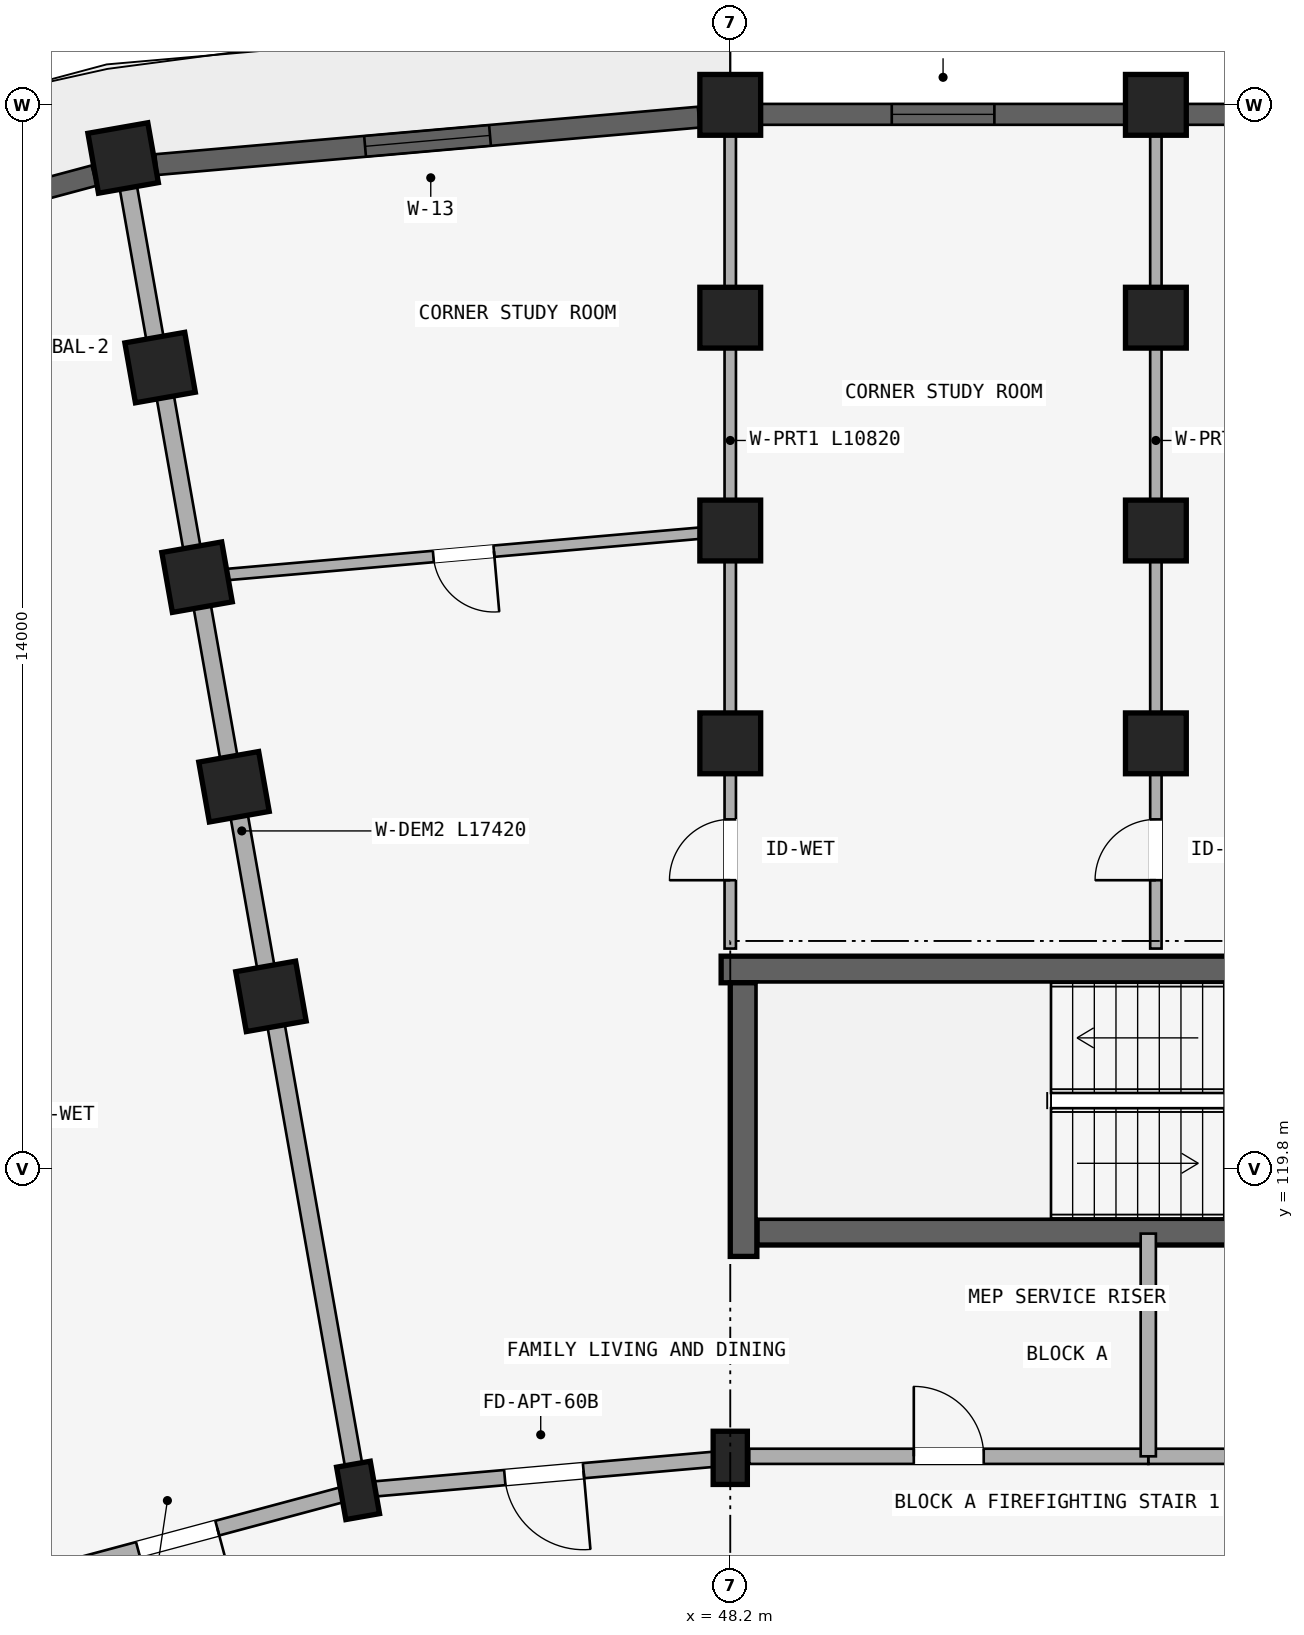
"""IFC4 building model, lengths in metres.
Left out: names, types, materials, properties, quantities, classifications, styles, units other than length and angle.
Written with IfcOpenShell. Run it as: python <this file> out.ifc"""

import sys

from ifc_helpers import new_model, si_unit, direction, frame, frame_2d, origin, origin_2d, place, context, subcontext, project, spatial, rectangle, extrude, element, fill, save


model = new_model("IFC4")
c1 = context("Model", 3, precision=1e-05, world=origin(), true_north=direction((0.0, 1.0)))
c2 = subcontext(c1, "Body", "Model", "MODEL_VIEW")
j1 = project(units=[si_unit("LENGTHUNIT", "METRE"), si_unit("PLANEANGLEUNIT", "RADIAN")], contexts=[c1])
p1 = place(None, origin())
s1 = spatial("IfcSite", under=j1, at=p1, CompositionType="ELEMENT")
p2 = place(p1, origin())
s2 = spatial("IfcBuilding", under=s1, at=p2, CompositionType="ELEMENT")
p3 = place(p2, frame((0.0, 0.0, 11.85)))
s3 = spatial("IfcBuildingStorey", under=s2, at=p3, CompositionType="ELEMENT", Elevation=11.85)
p4 = place(p3, frame((48.08, 122.425, 0.0), z_axis=(0.0, 0.0, 1.0), x_axis=(1.0, 0.0, 0.0)))
e1 = element("IfcWall", 1, at=p4, inside=s3, PredefinedType="SHEAR", context=c2, shape_type="SweptSolid", body=[
    extrude(rectangle(XDim=8.545, YDim=0.35, at=frame_2d((4.272, 0.0))), origin(), (0.0, 0.0, 1.0), 2.93),
])
p5 = place(p3, frame((48.55, 118.975, 0.0), z_axis=(0.0, 0.0, 1.0), x_axis=(1.0, 0.0, 0.0)))
e2 = element("IfcWall", 2, at=p5, inside=s3, PredefinedType="SHEAR", context=c2, shape_type="SweptSolid", body=[
    extrude(rectangle(XDim=8.075, YDim=0.35, at=frame_2d((4.038, 0.0))), origin(), (0.0, 0.0, 1.0), 2.93),
])
p6 = place(p5, frame((6.38, 0.0, 0.0)))
e3 = element("IfcOpeningElement", 3, at=p6, cuts=e2, PredefinedType="OPENING", context=c2, shape_type="SweptSolid", body=[
    extrude(rectangle(XDim=1.24, YDim=2.15, at=frame_2d((0.62, 1.075))), frame((0.0, 0.185, 0.0), z_axis=(0.0, -1.0, 0.0), x_axis=(1.0, 0.0, 0.0)), (0.0, 0.0, 1.0), 0.37),
])
p7 = place(p3, frame((48.375, 118.65, 0.0), z_axis=(0.0, 0.0, 1.0), x_axis=(0.0, 1.0, 0.0)))
e4 = element("IfcWall", 4, at=p7, inside=s3, PredefinedType="SHEAR", context=c2, shape_type="SweptSolid", body=[
    extrude(rectangle(XDim=3.6, YDim=0.35, at=frame_2d((1.8, 0.0))), origin(), (0.0, 0.0, 1.0), 2.93),
])
p8 = place(p3, frame((48.2, 116.0, 0.0), z_axis=(0.0, 0.0, 1.0), x_axis=(1.0, 0.0, 0.0)))
e5 = element("IfcColumn", 5, at=p8, inside=s3, PredefinedType="COLUMN", context=c2, shape_type="SweptSolid", body=[
    extrude(rectangle(XDim=0.45, YDim=0.7, at=origin_2d()), origin(), (0.0, 0.0, 1.0), 2.93),
])
for number, where, z_axis, x_axis in (
    (6, (48.2, 125.4, 0.0), (0.0, 0.0, 1.0), (1.0, 0.0, 0.0)),
    (7, (48.2, 128.2, 0.0), (0.0, 0.0, 1.0), (1.0, 0.0, 0.0)),
    (8, (48.2, 131.0, 0.0), (0.0, 0.0, 1.0), (1.0, 0.0, 0.0)),
    (9, (48.2, 133.8, 0.0), (0.0, 0.0, 1.0), (1.0, 0.0, 0.0)),
):
    element("IfcColumn", number, at=place(p3, frame(where, z_axis=z_axis, x_axis=x_axis)), inside=s3, PredefinedType="COLUMN", context=c2, shape_type="SweptSolid", body=[
        extrude(rectangle(XDim=0.8, YDim=0.8, at=origin_2d()), origin(), (0.0, 0.0, 1.0), 2.93),
    ])
p9 = place(p3, frame((43.303, 115.572, 0.0), z_axis=(0.0, 0.0, 1.0), x_axis=(0.984807753012, 0.173648177667, 0.0)))
e10 = element("IfcColumn", 10, at=p9, inside=s3, PredefinedType="COLUMN", context=c2, shape_type="SweptSolid", body=[
    extrude(rectangle(XDim=0.45, YDim=0.7, at=origin_2d()), origin(), (0.0, 0.0, 1.0), 2.93),
])
for number, where, z_axis, x_axis in (
    (11, (42.157, 122.071, 0.0), (0.0, 0.0, 1.0), (0.985, 0.174, 0.0)),
    (12, (41.671, 124.829, 0.0), (0.0, 0.0, 1.0), (0.985, 0.174, 0.0)),
    (13, (41.185, 127.586, 0.0), (0.0, 0.0, 1.0), (0.985, 0.174, 0.0)),
    (14, (40.698, 130.344, 0.0), (0.0, 0.0, 1.0), (0.985, 0.174, 0.0)),
    (15, (40.212, 133.101, 0.0), (0.0, 0.0, 1.0), (0.985, 0.174, 0.0)),
    (16, (53.8, 125.4, 0.0), (0.0, 0.0, 1.0), (1.0, 0.0, 0.0)),
    (17, (53.8, 128.2, 0.0), (0.0, 0.0, 1.0), (1.0, 0.0, 0.0)),
    (18, (53.8, 131.0, 0.0), (0.0, 0.0, 1.0), (1.0, 0.0, 0.0)),
    (19, (53.8, 133.8, 0.0), (0.0, 0.0, 1.0), (1.0, 0.0, 0.0)),
):
    element("IfcColumn", number, at=place(p3, frame(where, z_axis=z_axis, x_axis=x_axis)), inside=s3, PredefinedType="COLUMN", context=c2, shape_type="SweptSolid", body=[
        extrude(rectangle(XDim=0.8, YDim=0.8, at=origin_2d()), origin(), (0.0, 0.0, 1.0), 2.93),
    ])
p10 = place(p3, frame((53.7, 116.02, 0.0), z_axis=(0.0, 0.0, 1.0), x_axis=(1.0, 0.0, 0.0)))
e20 = element("IfcWall", 20, at=p10, inside=s3, PredefinedType="STANDARD", context=c2, shape_type="SweptSolid", body=[
    extrude(rectangle(XDim=5.65, YDim=0.2, at=frame_2d((2.825, 0.0))), origin(), (0.0, 0.0, 1.0), 2.372),
])
p11 = place(p10, frame((1.923, 0.0, 0.0)))
e21 = element("IfcOpeningElement", 21, at=p11, cuts=e20, PredefinedType="OPENING", context=c2, shape_type="SweptSolid", body=[
    extrude(rectangle(XDim=1.24, YDim=2.15, at=frame_2d((0.62, 1.075))), frame((0.0, 0.11, 0.0), z_axis=(0.0, -1.0, 0.0), x_axis=(1.0, 0.0, 0.0)), (0.0, 0.0, 1.0), 0.22),
])
p12 = place(p3, frame((48.45, 116.02, 0.0), z_axis=(0.0, 0.0, 1.0), x_axis=(1.0, 0.0, 0.0)))
e22 = element("IfcWall", 22, at=p12, inside=s3, PredefinedType="STANDARD", context=c2, shape_type="SweptSolid", body=[
    extrude(rectangle(XDim=5.25, YDim=0.2, at=frame_2d((2.625, 0.0))), origin(), (0.0, 0.0, 1.0), 2.372),
])
p13 = place(p12, frame((2.165, 0.0, 0.0)))
e23 = element("IfcOpeningElement", 23, at=p13, cuts=e22, PredefinedType="OPENING", context=c2, shape_type="SweptSolid", body=[
    extrude(rectangle(XDim=0.92, YDim=2.1, at=frame_2d((0.46, 1.05))), frame((0.0, 0.11, 0.0), z_axis=(0.0, -1.0, 0.0), x_axis=(1.0, 0.0, 0.0)), (0.0, 0.0, 1.0), 0.22),
])
p14 = place(p3, frame((53.7, 116.02, 0.0), z_axis=(0.0, 0.0, 1.0), x_axis=(0.0, 1.0, 0.0)))
e24 = element("IfcWall", 24, at=p14, inside=s3, PredefinedType="STANDARD", context=c2, shape_type="SweptSolid", body=[
    extrude(rectangle(XDim=2.93, YDim=0.2, at=frame_2d((1.465, 0.0))), origin(), (0.0, 0.0, 1.0), 2.372),
])
p15 = place(p3, frame((53.8, 122.7, 0.0), z_axis=(0.0, 0.0, 1.0), x_axis=(0.0, 1.0, 0.0)))
e25 = element("IfcWall", 25, at=p15, inside=s3, PredefinedType="PARTITIONING", context=c2, shape_type="SweptSolid", body=[
    extrude(rectangle(XDim=10.82, YDim=0.15, at=frame_2d((5.41, 0.0))), origin(), (0.0, 0.0, 1.0), 2.372),
])
p16 = place(p15, frame((0.899, 0.0, 0.0)))
e26 = element("IfcOpeningElement", 26, at=p16, cuts=e25, PredefinedType="OPENING", context=c2, shape_type="SweptSolid", body=[
    extrude(rectangle(XDim=0.8, YDim=2.1, at=frame_2d((0.4, 1.05))), frame((0.0, 0.085, 0.0), z_axis=(0.0, -1.0, 0.0), x_axis=(1.0, 0.0, 0.0)), (0.0, 0.0, 1.0), 0.17),
])
p17 = place(p3, frame((48.2, 116.0, 0.0), z_axis=(0.0, 0.0, 1.0), x_axis=(-0.996193663584, -0.087167566415, 0.0)))
e27 = element("IfcWall", 27, at=p17, inside=s3, PredefinedType="STANDARD", context=c2, shape_type="SweptSolid", body=[
    extrude(rectangle(XDim=4.916, YDim=0.2, at=frame_2d((2.458, 0.0))), origin(), (0.0, 0.0, 1.0), 2.372),
])
p18 = place(p17, frame((1.938, 0.0, 0.0)))
e28 = element("IfcOpeningElement", 28, at=p18, cuts=e27, PredefinedType="OPENING", context=c2, shape_type="SweptSolid", body=[
    extrude(rectangle(XDim=1.04, YDim=2.15, at=frame_2d((0.52, 1.075))), frame((0.0, 0.11, 0.0), z_axis=(0.0, -1.0, 0.0), x_axis=(1.0, 0.0, 0.0)), (0.0, 0.0, 1.0), 0.22),
])
p19 = place(p3, frame((43.303, 115.572, 0.0), z_axis=(0.0, 0.0, 1.0), x_axis=(-0.965930095386, -0.258803112091, 0.0)))
e29 = element("IfcWall", 29, at=p19, inside=s3, PredefinedType="STANDARD", context=c2, shape_type="SweptSolid", body=[
    extrude(rectangle(XDim=4.916, YDim=0.2, at=frame_2d((2.458, 0.0))), origin(), (0.0, 0.0, 1.0), 2.372),
])
p20 = place(p19, frame((1.918, 0.0, 0.0)))
e30 = element("IfcOpeningElement", 30, at=p20, cuts=e29, PredefinedType="OPENING", context=c2, shape_type="SweptSolid", body=[
    extrude(rectangle(XDim=1.08, YDim=2.15, at=frame_2d((0.54, 1.075))), frame((0.0, 0.11, 0.0), z_axis=(0.0, -1.0, 0.0), x_axis=(1.0, 0.0, 0.0)), (0.0, 0.0, 1.0), 0.22),
])
p21 = place(p3, frame((48.2, 122.7, 0.0), z_axis=(0.0, 0.0, 1.0), x_axis=(0.0, 1.0, 0.0)))
e31 = element("IfcWall", 31, at=p21, inside=s3, PredefinedType="PARTITIONING", context=c2, shape_type="SweptSolid", body=[
    extrude(rectangle(XDim=10.82, YDim=0.15, at=frame_2d((5.41, 0.0))), origin(), (0.0, 0.0, 1.0), 2.372),
])
p22 = place(p21, frame((0.899, 0.0, 0.0)))
e32 = element("IfcOpeningElement", 32, at=p22, cuts=e31, PredefinedType="OPENING", context=c2, shape_type="SweptSolid", body=[
    extrude(rectangle(XDim=0.8, YDim=2.1, at=frame_2d((0.4, 1.05))), frame((0.0, 0.085, 0.0), z_axis=(0.0, -1.0, 0.0), x_axis=(1.0, 0.0, 0.0)), (0.0, 0.0, 1.0), 0.17),
])
p23 = place(p3, frame((43.286, 115.67, 0.0), z_axis=(0.0, 0.0, 1.0), x_axis=(-0.173646216546, 0.984808098809, 0.0)))
e33 = element("IfcWall", 33, at=p23, inside=s3, PredefinedType="STANDARD", context=c2, shape_type="SweptSolid", body=[
    extrude(rectangle(XDim=17.42, YDim=0.23, at=frame_2d((8.71, 0.0))), origin(), (0.0, 0.0, 1.0), 2.372),
])
p24 = place(p3, frame((48.2, 128.2, 0.0), z_axis=(0.0, 0.0, 1.0), x_axis=(-0.996194658198, -0.087156198737, 0.0)))
e34 = element("IfcWall", 34, at=p24, inside=s3, PredefinedType="PLUMBINGWALL", context=c2, shape_type="SweptSolid", body=[
    extrude(rectangle(XDim=7.042, YDim=0.15, at=frame_2d((3.521, 0.0))), origin(), (0.0, 0.0, 1.0), 2.372),
])
p25 = place(p24, frame((3.121, 0.0, 0.0)))
e35 = element("IfcOpeningElement", 35, at=p25, cuts=e34, PredefinedType="OPENING", context=c2, shape_type="SweptSolid", body=[
    extrude(rectangle(XDim=0.8, YDim=2.1, at=frame_2d((0.4, 1.05))), frame((0.0, 0.085, 0.0), z_axis=(0.0, -1.0, 0.0), x_axis=(1.0, 0.0, 0.0)), (0.0, 0.0, 1.0), 0.17),
])
p26 = place(p3, frame((47.785, 133.638, 0.0), z_axis=(0.0, 0.0, 1.0), x_axis=(-0.99619608453, -0.08713989423, 0.0)))
e36 = element("IfcWall", 36, at=p26, inside=s3, PredefinedType="STANDARD", context=c2, shape_type="SweptSolid", body=[
    extrude(rectangle(XDim=7.164, YDim=0.275, at=frame_2d((3.582, 0.0))), origin(), (0.0, 0.0, 1.0), 2.372),
])
p27 = place(p26, frame((2.757, 0.0, 0.422)))
e37 = element("IfcOpeningElement", 37, at=p27, cuts=e36, PredefinedType="OPENING", context=c2, shape_type="SweptSolid", body=[
    extrude(rectangle(XDim=1.65, YDim=1.75, at=frame_2d((0.825, 0.875))), frame((0.0, 0.147, 0.0), z_axis=(0.0, -1.0, 0.0), x_axis=(1.0, 0.0, 0.0)), (0.0, 0.0, 1.0), 0.295),
])
p28 = place(p3, frame((39.832, 132.87, 0.0), z_axis=(0.0, 0.0, 1.0), x_axis=(-0.965923712619, -0.258826933296, 0.0)))
e38 = element("IfcWall", 38, at=p28, inside=s3, PredefinedType="STANDARD", context=c2, shape_type="SweptSolid", body=[
    extrude(rectangle(XDim=7.164, YDim=0.275, at=frame_2d((3.582, 0.0))), origin(), (0.0, 0.0, 1.0), 2.372),
])
p29 = place(p28, frame((4.69, 0.0, 0.522)))
e39 = element("IfcOpeningElement", 39, at=p29, cuts=e38, PredefinedType="OPENING", context=c2, shape_type="SweptSolid", body=[
    extrude(rectangle(XDim=1.2, YDim=1.5, at=frame_2d((0.6, 0.75))), frame((0.0, 0.147, 0.0), z_axis=(0.0, -1.0, 0.0), x_axis=(1.0, 0.0, 0.0)), (0.0, 0.0, 1.0), 0.295),
])
p30 = place(p28, frame((1.877, 0.0, 0.0)))
e40 = element("IfcOpeningElement", 40, at=p30, cuts=e38, PredefinedType="OPENING", context=c2, shape_type="SweptSolid", body=[
    extrude(rectangle(XDim=1.26, YDim=2.15, at=frame_2d((0.63, 1.075))), frame((0.0, 0.147, 0.0), z_axis=(0.0, -1.0, 0.0), x_axis=(1.0, 0.0, 0.0)), (0.0, 0.0, 1.0), 0.295),
])
p31 = place(p3, frame((48.604, 133.675, 0.0), z_axis=(0.0, 0.0, 1.0), x_axis=(1.0, 0.0, 0.0)))
e41 = element("IfcWall", 41, at=p31, inside=s3, PredefinedType="STANDARD", context=c2, shape_type="SweptSolid", body=[
    extrude(rectangle(XDim=4.793, YDim=0.275, at=frame_2d((2.396, 0.0))), origin(), (0.0, 0.0, 1.0), 2.472),
])
p32 = place(p31, frame((1.721, 0.0, 0.672)))
e42 = element("IfcOpeningElement", 42, at=p32, cuts=e41, PredefinedType="OPENING", context=c2, shape_type="SweptSolid", body=[
    extrude(rectangle(XDim=1.35, YDim=1.6, at=frame_2d((0.675, 0.8))), frame((0.0, 0.147, 0.0), z_axis=(0.0, -1.0, 0.0), x_axis=(1.0, 0.0, 0.0)), (0.0, 0.0, 1.0), 0.295),
])
p33 = place(p3, frame((54.204, 133.675, 0.0), z_axis=(0.0, 0.0, 1.0), x_axis=(1.0, 0.0, 0.0)))
e43 = element("IfcWall", 43, at=p33, inside=s3, PredefinedType="STANDARD", context=c2, shape_type="SweptSolid", body=[
    extrude(rectangle(XDim=4.793, YDim=0.275, at=frame_2d((2.396, 0.0))), origin(), (0.0, 0.0, 1.0), 2.472),
])
p34 = place(p33, frame((1.796, 0.0, 0.772)))
e44 = element("IfcOpeningElement", 44, at=p34, cuts=e43, PredefinedType="OPENING", context=c2, shape_type="SweptSolid", body=[
    extrude(rectangle(XDim=1.2, YDim=1.5, at=frame_2d((0.6, 0.75))), frame((0.0, 0.147, 0.0), z_axis=(0.0, -1.0, 0.0), x_axis=(1.0, 0.0, 0.0)), (0.0, 0.0, 1.0), 0.295),
])
p35 = place(p27, origin())
e45 = element("IfcWindow", 45, at=p35, inside=s3, PartitioningType="DOUBLE_PANEL_VERTICAL", PredefinedType="WINDOW", context=c2, shape_type="SweptSolid", body=[
    extrude(rectangle(XDim=1.65, YDim=1.75, at=frame_2d((0.825, 0.875))), frame((0.0, 0.03, 0.0), z_axis=(0.0, -1.0, 0.0), x_axis=(1.0, 0.0, 0.0)), (0.0, 0.0, 1.0), 0.06),
])
fill(e37, e45)
p36 = place(p32, origin())
e46 = element("IfcWindow", 46, at=p36, inside=s3, PartitioningType="DOUBLE_PANEL_VERTICAL", PredefinedType="WINDOW", context=c2, shape_type="SweptSolid", body=[
    extrude(rectangle(XDim=1.35, YDim=1.6, at=frame_2d((0.675, 0.8))), frame((0.0, 0.03, 0.0), z_axis=(0.0, -1.0, 0.0), x_axis=(1.0, 0.0, 0.0)), (0.0, 0.0, 1.0), 0.06),
])
fill(e42, e46)
p37 = place(p13, origin())
e47 = element("IfcDoor", 47, at=p37, inside=s3, OperationType="SINGLE_SWING_LEFT", PredefinedType="DOOR", context=c2, shape_type="SweptSolid", body=[
    extrude(rectangle(XDim=0.92, YDim=2.1, at=frame_2d((0.46, 1.05))), frame((0.0, 0.025, 0.0), z_axis=(0.0, -1.0, 0.0), x_axis=(1.0, 0.0, 0.0)), (0.0, 0.0, 1.0), 0.05),
])
fill(e23, e47)
p38 = place(p16, origin())
e48 = element("IfcDoor", 48, at=p38, inside=s3, OperationType="SINGLE_SWING_LEFT", PredefinedType="DOOR", context=c2, shape_type="SweptSolid", body=[
    extrude(rectangle(XDim=0.8, YDim=2.1, at=frame_2d((0.4, 1.05))), frame((0.0, 0.025, 0.0), z_axis=(0.0, -1.0, 0.0), x_axis=(1.0, 0.0, 0.0)), (0.0, 0.0, 1.0), 0.05),
])
fill(e26, e48)
p39 = place(p22, origin())
e49 = element("IfcDoor", 49, at=p39, inside=s3, OperationType="SINGLE_SWING_LEFT", PredefinedType="DOOR", context=c2, shape_type="SweptSolid", body=[
    extrude(rectangle(XDim=0.8, YDim=2.1, at=frame_2d((0.4, 1.05))), frame((0.0, 0.025, 0.0), z_axis=(0.0, -1.0, 0.0), x_axis=(1.0, 0.0, 0.0)), (0.0, 0.0, 1.0), 0.05),
])
fill(e32, e49)
p40 = place(p18, origin())
e50 = element("IfcDoor", 50, at=p40, inside=s3, OperationType="SINGLE_SWING_LEFT", PredefinedType="DOOR", context=c2, shape_type="SweptSolid", body=[
    extrude(rectangle(XDim=1.04, YDim=2.15, at=frame_2d((0.52, 1.075))), frame((0.0, 0.025, 0.0), z_axis=(0.0, -1.0, 0.0), x_axis=(1.0, 0.0, 0.0)), (0.0, 0.0, 1.0), 0.05),
])
fill(e28, e50)
p41 = place(p25, frame((0.8, 0.0, 0.0), z_axis=(0.0, 0.0, 1.0), x_axis=(-1.0, 0.0, 0.0)))
e51 = element("IfcDoor", 51, at=p41, inside=s3, OperationType="SINGLE_SWING_RIGHT", PredefinedType="DOOR", context=c2, shape_type="SweptSolid", body=[
    extrude(rectangle(XDim=0.8, YDim=2.1, at=frame_2d((0.4, 1.05))), frame((0.0, 0.025, 0.0), z_axis=(0.0, -1.0, 0.0), x_axis=(1.0, 0.0, 0.0)), (0.0, 0.0, 1.0), 0.05),
])
fill(e35, e51)
p42 = place(p20, origin())
e52 = element("IfcDoor", 52, at=p42, inside=s3, OperationType="SINGLE_SWING_LEFT", PredefinedType="DOOR", context=c2, shape_type="SweptSolid", body=[
    extrude(rectangle(XDim=1.08, YDim=2.15, at=frame_2d((0.54, 1.075))), frame((0.0, 0.025, 0.0), z_axis=(0.0, -1.0, 0.0), x_axis=(1.0, 0.0, 0.0)), (0.0, 0.0, 1.0), 0.05),
])
fill(e30, e52)
save(model, sys.argv[1])
